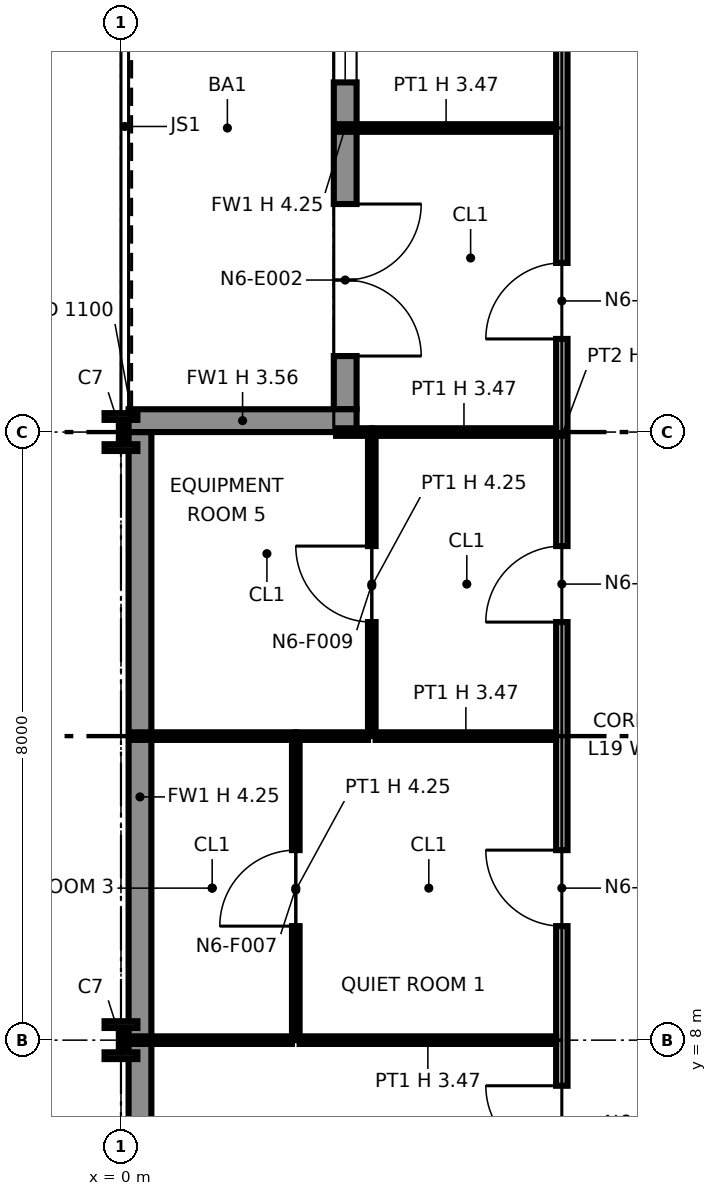
"""IFC4 building model, lengths in metres.
Left out: names, types, materials, properties, quantities, classifications, styles, units other than length and angle.
Written with IfcOpenShell. Run it as: python <this file> out.ifc"""

import sys

from ifc_helpers import new_model, si_unit, direction, frame, frame_2d, origin, origin_2d, place, context, subcontext, project, spatial, polyline, rectangle, i_section, outline, extrude, element, fill, save


model = new_model("IFC4")
c1 = context("Model", 3, precision=1e-05, world=origin(), true_north=direction((0.0, 1.0)))
c2 = subcontext(c1, "Body", "Model", "MODEL_VIEW")
j1 = project(units=[si_unit("LENGTHUNIT", "METRE"), si_unit("PLANEANGLEUNIT", "RADIAN")], contexts=[c1])
p1 = place(None, origin())
s1 = spatial("IfcSite", under=j1, at=p1, CompositionType="ELEMENT")
p2 = place(p1, origin())
s2 = spatial("IfcBuilding", under=s1, at=p2, CompositionType="ELEMENT")
p3 = place(p2, frame((0.0, 0.0, 100.8)))
s3 = spatial("IfcBuildingStorey", under=s2, at=p3, CompositionType="ELEMENT", Elevation=100.8)
for number, where, z_axis, x_axis in (
    (1, (0.0, 8.0, 0.0), (0.0, 0.0, 1.0), (1.0, 0.0, 0.0)),
    (2, (0.0, 16.0, 0.0), (0.0, 0.0, 1.0), (1.0, 0.0, 0.0)),
):
    element("IfcColumn", number, at=place(p3, frame(where, z_axis=z_axis, x_axis=x_axis)), inside=s3, PredefinedType="COLUMN", context=c2, shape_type="SweptSolid", body=[
        extrude(i_section(OverallWidth=0.432, OverallDepth=0.498, WebThickness=0.056, FlangeThickness=0.089, at=origin_2d()), origin(), (0.0, 0.0, 1.0), 4.25),
    ])
p4 = place(p3, frame((2.95, 23.7, 0.0), z_axis=(0.0, 0.0, 1.0), x_axis=(0.0, -1.0, 0.0)))
e3 = element("IfcWall", 3, at=p4, inside=s3, PredefinedType="SOLIDWALL", context=c2, shape_type="SweptSolid", body=[
    extrude(rectangle(XDim=7.4, YDim=0.3, at=frame_2d((3.7, 0.0))), origin(), (0.0, 0.0, 1.0), 4.25),
])
p5 = place(p4, frame((0.3, 0.0, 0.9)))
e4 = element("IfcOpeningElement", 4, at=p5, cuts=e3, PredefinedType="OPENING", context=c2, shape_type="SweptSolid", body=[
    extrude(rectangle(XDim=2.8, YDim=2.2, at=frame_2d((1.4, 1.1))), frame((0.0, 0.16, 0.0), z_axis=(0.0, -1.0, 0.0), x_axis=(1.0, 0.0, 0.0)), (0.0, 0.0, 1.0), 0.32),
])
p6 = place(p4, frame((4.7, 0.0, 0.0)))
e5 = element("IfcOpeningElement", 5, at=p6, cuts=e3, PredefinedType="OPENING", context=c2, shape_type="SweptSolid", body=[
    extrude(rectangle(XDim=2.0, YDim=2.4, at=frame_2d((1.0, 1.2))), frame((0.0, 0.16, 0.0), z_axis=(0.0, -1.0, 0.0), x_axis=(1.0, 0.0, 0.0)), (0.0, 0.0, 1.0), 0.32),
])
p7 = place(p3, frame((0.1, 16.15, 0.0), z_axis=(0.0, 0.0, 1.0), x_axis=(1.0, 0.0, 0.0)))
e6 = element("IfcWall", 6, at=p7, inside=s3, PredefinedType="SOLIDWALL", context=c2, shape_type="SweptSolid", body=[
    extrude(rectangle(XDim=3.0, YDim=0.3, at=frame_2d((1.5, 0.0))), origin(), (0.0, 0.0, 1.0), 3.556),
])
p8 = place(p3, frame((0.25, 16.0, 0.0), z_axis=(0.0, 0.0, 1.0), x_axis=(0.0, -1.0, 0.0)))
e7 = element("IfcWall", 7, at=p8, inside=s3, PredefinedType="SOLIDWALL", context=c2, shape_type="SweptSolid", body=[
    extrude(rectangle(XDim=9.6, YDim=0.3, at=frame_2d((4.8, 0.0))), origin(), (0.0, 0.0, 1.0), 4.25),
])
p9 = place(p3, frame((5.8, 5.8, 0.0), z_axis=(0.0, 0.0, 1.0), x_axis=(0.0, 1.0, 0.0)))
e8 = element("IfcWall", 8, at=p9, inside=s3, PredefinedType="PARTITIONING", context=c2, shape_type="SweptSolid", body=[
    extrude(outline(polyline([(0.0, 0.0), (20.325, 0.0), (20.325, 4.25), (18.5, 4.25), (18.498, 3.47), (17.902, 3.47), (17.9, 4.25), (14.5, 4.25), (14.498, 3.47), (13.902, 3.47), (13.9, 4.25), (10.5, 4.25), (10.498, 3.47), (9.902, 3.47), (9.9, 4.25), (6.5, 4.25), (6.498, 3.47), (5.902, 3.47), (5.9, 4.25), (2.5, 4.25), (2.498, 3.47), (1.902, 3.47), (1.9, 4.25), (0.0, 4.25), (0.0, 0.0)])), frame((0.0, 0.075, 0.0), z_axis=(0.0, -1.0, 0.0), x_axis=(1.0, 0.0, 0.0)), (0.0, 0.0, 1.0), 0.15),
])
p10 = place(p9, frame((0.6, 0.0, 0.0)))
e9 = element("IfcOpeningElement", 9, at=p10, cuts=e8, PredefinedType="OPENING", context=c2, shape_type="SweptSolid", body=[
    extrude(rectangle(XDim=1.0, YDim=2.1, at=frame_2d((0.5, 1.05))), frame((0.0, 0.085, 0.0), z_axis=(0.0, -1.0, 0.0), x_axis=(1.0, 0.0, 0.0)), (0.0, 0.0, 1.0), 0.17),
])
p11 = place(p9, frame((3.7, 0.0, 0.0)))
e10 = element("IfcOpeningElement", 10, at=p11, cuts=e8, PredefinedType="OPENING", context=c2, shape_type="SweptSolid", body=[
    extrude(rectangle(XDim=1.0, YDim=2.1, at=frame_2d((0.5, 1.05))), frame((0.0, 0.085, 0.0), z_axis=(0.0, -1.0, 0.0), x_axis=(1.0, 0.0, 0.0)), (0.0, 0.0, 1.0), 0.17),
])
p12 = place(p9, frame((7.7, 0.0, 0.0)))
e11 = element("IfcOpeningElement", 11, at=p12, cuts=e8, PredefinedType="OPENING", context=c2, shape_type="SweptSolid", body=[
    extrude(rectangle(XDim=1.0, YDim=2.1, at=frame_2d((0.5, 1.05))), frame((0.0, 0.085, 0.0), z_axis=(0.0, -1.0, 0.0), x_axis=(1.0, 0.0, 0.0)), (0.0, 0.0, 1.0), 0.17),
])
p13 = place(p9, frame((11.425, 0.0, 0.0)))
e12 = element("IfcOpeningElement", 12, at=p13, cuts=e8, PredefinedType="OPENING", context=c2, shape_type="SweptSolid", body=[
    extrude(rectangle(XDim=1.0, YDim=2.1, at=frame_2d((0.5, 1.05))), frame((0.0, 0.085, 0.0), z_axis=(0.0, -1.0, 0.0), x_axis=(1.0, 0.0, 0.0)), (0.0, 0.0, 1.0), 0.17),
])
p14 = place(p9, frame((15.7, 0.0, 0.0)))
e13 = element("IfcOpeningElement", 13, at=p14, cuts=e8, PredefinedType="OPENING", context=c2, shape_type="SweptSolid", body=[
    extrude(rectangle(XDim=1.0, YDim=2.1, at=frame_2d((0.5, 1.05))), frame((0.0, 0.085, 0.0), z_axis=(0.0, -1.0, 0.0), x_axis=(1.0, 0.0, 0.0)), (0.0, 0.0, 1.0), 0.17),
])
p15 = place(p3, frame((0.13, 8.0, 0.0), z_axis=(0.0, 0.0, 1.0), x_axis=(1.0, 0.0, 0.0)))
e14 = element("IfcWall", 14, at=p15, inside=s3, PredefinedType="PARTITIONING", context=c2, shape_type="SweptSolid", body=[
    extrude(rectangle(XDim=2.12, YDim=0.1, at=frame_2d((1.06, 0.0))), origin(), (0.0, 0.0, 1.0), 3.47),
])
p16 = place(p3, frame((2.35, 8.0, 0.0), z_axis=(0.0, 0.0, 1.0), x_axis=(1.0, 0.0, 0.0)))
e15 = element("IfcWall", 15, at=p16, inside=s3, PredefinedType="PARTITIONING", context=c2, shape_type="SweptSolid", body=[
    extrude(rectangle(XDim=3.375, YDim=0.1, at=frame_2d((1.688, 0.0))), origin(), (0.0, 0.0, 1.0), 3.47),
])
p17 = place(p3, frame((2.3, 8.0, 0.0), z_axis=(0.0, 0.0, 1.0), x_axis=(0.0, 1.0, 0.0)))
e16 = element("IfcWall", 16, at=p17, inside=s3, PredefinedType="PARTITIONING", context=c2, shape_type="SweptSolid", body=[
    extrude(rectangle(XDim=3.95, YDim=0.1, at=frame_2d((1.975, 0.0))), origin(), (0.0, 0.0, 1.0), 4.25),
])
p18 = place(p17, frame((1.5, 0.0, 0.0)))
e17 = element("IfcOpeningElement", 17, at=p18, cuts=e16, PredefinedType="OPENING", context=c2, shape_type="SweptSolid", body=[
    extrude(rectangle(XDim=1.0, YDim=2.1, at=frame_2d((0.5, 1.05))), frame((0.0, 0.06, 0.0), z_axis=(0.0, -1.0, 0.0), x_axis=(1.0, 0.0, 0.0)), (0.0, 0.0, 1.0), 0.12),
])
p19 = place(p3, frame((0.13, 12.0, 0.0), z_axis=(0.0, 0.0, 1.0), x_axis=(1.0, 0.0, 0.0)))
e18 = element("IfcWall", 18, at=p19, inside=s3, PredefinedType="PARTITIONING", context=c2, shape_type="SweptSolid", body=[
    extrude(rectangle(XDim=2.17, YDim=0.1, at=frame_2d((1.085, 0.0))), origin(), (0.0, 0.0, 1.0), 3.47),
])
p20 = place(p3, frame((2.3, 12.0, 0.0), z_axis=(0.0, 0.0, 1.0), x_axis=(1.0, 0.0, 0.0)))
e19 = element("IfcWall", 19, at=p20, inside=s3, PredefinedType="PARTITIONING", context=c2, shape_type="SweptSolid", body=[
    extrude(rectangle(XDim=0.95, YDim=0.1, at=frame_2d((0.475, 0.0))), origin(), (0.0, 0.0, 1.0), 3.47),
])
p21 = place(p3, frame((3.35, 12.0, 0.0), z_axis=(0.0, 0.0, 1.0), x_axis=(1.0, 0.0, 0.0)))
e20 = element("IfcWall", 20, at=p21, inside=s3, PredefinedType="PARTITIONING", context=c2, shape_type="SweptSolid", body=[
    extrude(rectangle(XDim=2.375, YDim=0.1, at=frame_2d((1.188, 0.0))), origin(), (0.0, 0.0, 1.0), 3.47),
])
p22 = place(p3, frame((3.3, 12.0, 0.0), z_axis=(0.0, 0.0, 1.0), x_axis=(0.0, 1.0, 0.0)))
e21 = element("IfcWall", 21, at=p22, inside=s3, PredefinedType="PARTITIONING", context=c2, shape_type="SweptSolid", body=[
    extrude(rectangle(XDim=3.95, YDim=0.1, at=frame_2d((1.975, 0.0))), origin(), (0.0, 0.0, 1.0), 4.25),
])
p23 = place(p22, frame((1.5, 0.0, 0.0)))
e22 = element("IfcOpeningElement", 22, at=p23, cuts=e21, PredefinedType="OPENING", context=c2, shape_type="SweptSolid", body=[
    extrude(rectangle(XDim=1.0, YDim=2.1, at=frame_2d((0.5, 1.05))), frame((0.0, 0.06, 0.0), z_axis=(0.0, -1.0, 0.0), x_axis=(1.0, 0.0, 0.0)), (0.0, 0.0, 1.0), 0.12),
])
p24 = place(p3, frame((2.83, 16.0, 0.0), z_axis=(0.0, 0.0, 1.0), x_axis=(1.0, 0.0, 0.0)))
e23 = element("IfcWall", 23, at=p24, inside=s3, PredefinedType="PARTITIONING", context=c2, shape_type="SweptSolid", body=[
    extrude(rectangle(XDim=0.47, YDim=0.1, at=frame_2d((0.235, 0.0))), origin(), (0.0, 0.0, 1.0), 3.47),
])
p25 = place(p3, frame((3.3, 16.0, 0.0), z_axis=(0.0, 0.0, 1.0), x_axis=(1.0, 0.0, 0.0)))
e24 = element("IfcWall", 24, at=p25, inside=s3, PredefinedType="PARTITIONING", context=c2, shape_type="SweptSolid", body=[
    extrude(rectangle(XDim=2.425, YDim=0.1, at=frame_2d((1.212, 0.0))), origin(), (0.0, 0.0, 1.0), 3.47),
])
p26 = place(p3, frame((2.83, 20.0, 0.0), z_axis=(0.0, 0.0, 1.0), x_axis=(1.0, 0.0, 0.0)))
e25 = element("IfcWall", 25, at=p26, inside=s3, PredefinedType="PARTITIONING", context=c2, shape_type="SweptSolid", body=[
    extrude(rectangle(XDim=2.895, YDim=0.1, at=frame_2d((1.448, 0.0))), origin(), (0.0, 0.0, 1.0), 3.47),
])
p27 = place(p5, origin())
e26 = element("IfcWindow", 26, at=p27, inside=s3, PartitioningType="SINGLE_PANEL", PredefinedType="WINDOW", context=c2, shape_type="SweptSolid", body=[
    extrude(rectangle(XDim=2.8, YDim=2.2, at=frame_2d((1.4, 1.1))), frame((0.0, 0.03, 0.0), z_axis=(0.0, -1.0, 0.0), x_axis=(1.0, 0.0, 0.0)), (0.0, 0.0, 1.0), 0.06),
])
fill(e4, e26)
p28 = place(p6, origin())
e27 = element("IfcDoor", 27, at=p28, inside=s3, OperationType="DOUBLE_DOOR_SINGLE_SWING", PredefinedType="DOOR", context=c2, shape_type="SweptSolid", body=[
    extrude(rectangle(XDim=2.0, YDim=2.4, at=frame_2d((1.0, 1.2))), frame((0.0, 0.025, 0.0), z_axis=(0.0, -1.0, 0.0), x_axis=(1.0, 0.0, 0.0)), (0.0, 0.0, 1.0), 0.05),
])
fill(e5, e27)
p29 = place(p10, origin())
e28 = element("IfcDoor", 28, at=p29, inside=s3, OperationType="SINGLE_SWING_RIGHT", PredefinedType="DOOR", context=c2, shape_type="SweptSolid", body=[
    extrude(rectangle(XDim=1.0, YDim=2.1, at=frame_2d((0.5, 1.05))), frame((0.0, 0.025, 0.0), z_axis=(0.0, -1.0, 0.0), x_axis=(1.0, 0.0, 0.0)), (0.0, 0.0, 1.0), 0.05),
])
fill(e9, e28)
p30 = place(p11, origin())
e29 = element("IfcDoor", 29, at=p30, inside=s3, OperationType="SINGLE_SWING_RIGHT", PredefinedType="DOOR", context=c2, shape_type="SweptSolid", body=[
    extrude(rectangle(XDim=1.0, YDim=2.1, at=frame_2d((0.5, 1.05))), frame((0.0, 0.025, 0.0), z_axis=(0.0, -1.0, 0.0), x_axis=(1.0, 0.0, 0.0)), (0.0, 0.0, 1.0), 0.05),
])
fill(e10, e29)
p31 = place(p18, origin())
e30 = element("IfcDoor", 30, at=p31, inside=s3, OperationType="SINGLE_SWING_LEFT", PredefinedType="DOOR", context=c2, shape_type="SweptSolid", body=[
    extrude(rectangle(XDim=1.0, YDim=2.1, at=frame_2d((0.5, 1.05))), frame((0.0, 0.025, 0.0), z_axis=(0.0, -1.0, 0.0), x_axis=(1.0, 0.0, 0.0)), (0.0, 0.0, 1.0), 0.05),
])
fill(e17, e30)
p32 = place(p12, origin())
e31 = element("IfcDoor", 31, at=p32, inside=s3, OperationType="SINGLE_SWING_LEFT", PredefinedType="DOOR", context=c2, shape_type="SweptSolid", body=[
    extrude(rectangle(XDim=1.0, YDim=2.1, at=frame_2d((0.5, 1.05))), frame((0.0, 0.025, 0.0), z_axis=(0.0, -1.0, 0.0), x_axis=(1.0, 0.0, 0.0)), (0.0, 0.0, 1.0), 0.05),
])
fill(e11, e31)
p33 = place(p23, origin())
e32 = element("IfcDoor", 32, at=p33, inside=s3, OperationType="SINGLE_SWING_RIGHT", PredefinedType="DOOR", context=c2, shape_type="SweptSolid", body=[
    extrude(rectangle(XDim=1.0, YDim=2.1, at=frame_2d((0.5, 1.05))), frame((0.0, 0.025, 0.0), z_axis=(0.0, -1.0, 0.0), x_axis=(1.0, 0.0, 0.0)), (0.0, 0.0, 1.0), 0.05),
])
fill(e22, e32)
p34 = place(p13, origin())
e33 = element("IfcDoor", 33, at=p34, inside=s3, OperationType="SINGLE_SWING_LEFT", PredefinedType="DOOR", context=c2, shape_type="SweptSolid", body=[
    extrude(rectangle(XDim=1.0, YDim=2.1, at=frame_2d((0.5, 1.05))), frame((0.0, 0.025, 0.0), z_axis=(0.0, -1.0, 0.0), x_axis=(1.0, 0.0, 0.0)), (0.0, 0.0, 1.0), 0.05),
])
fill(e12, e33)
save(model, sys.argv[1])
